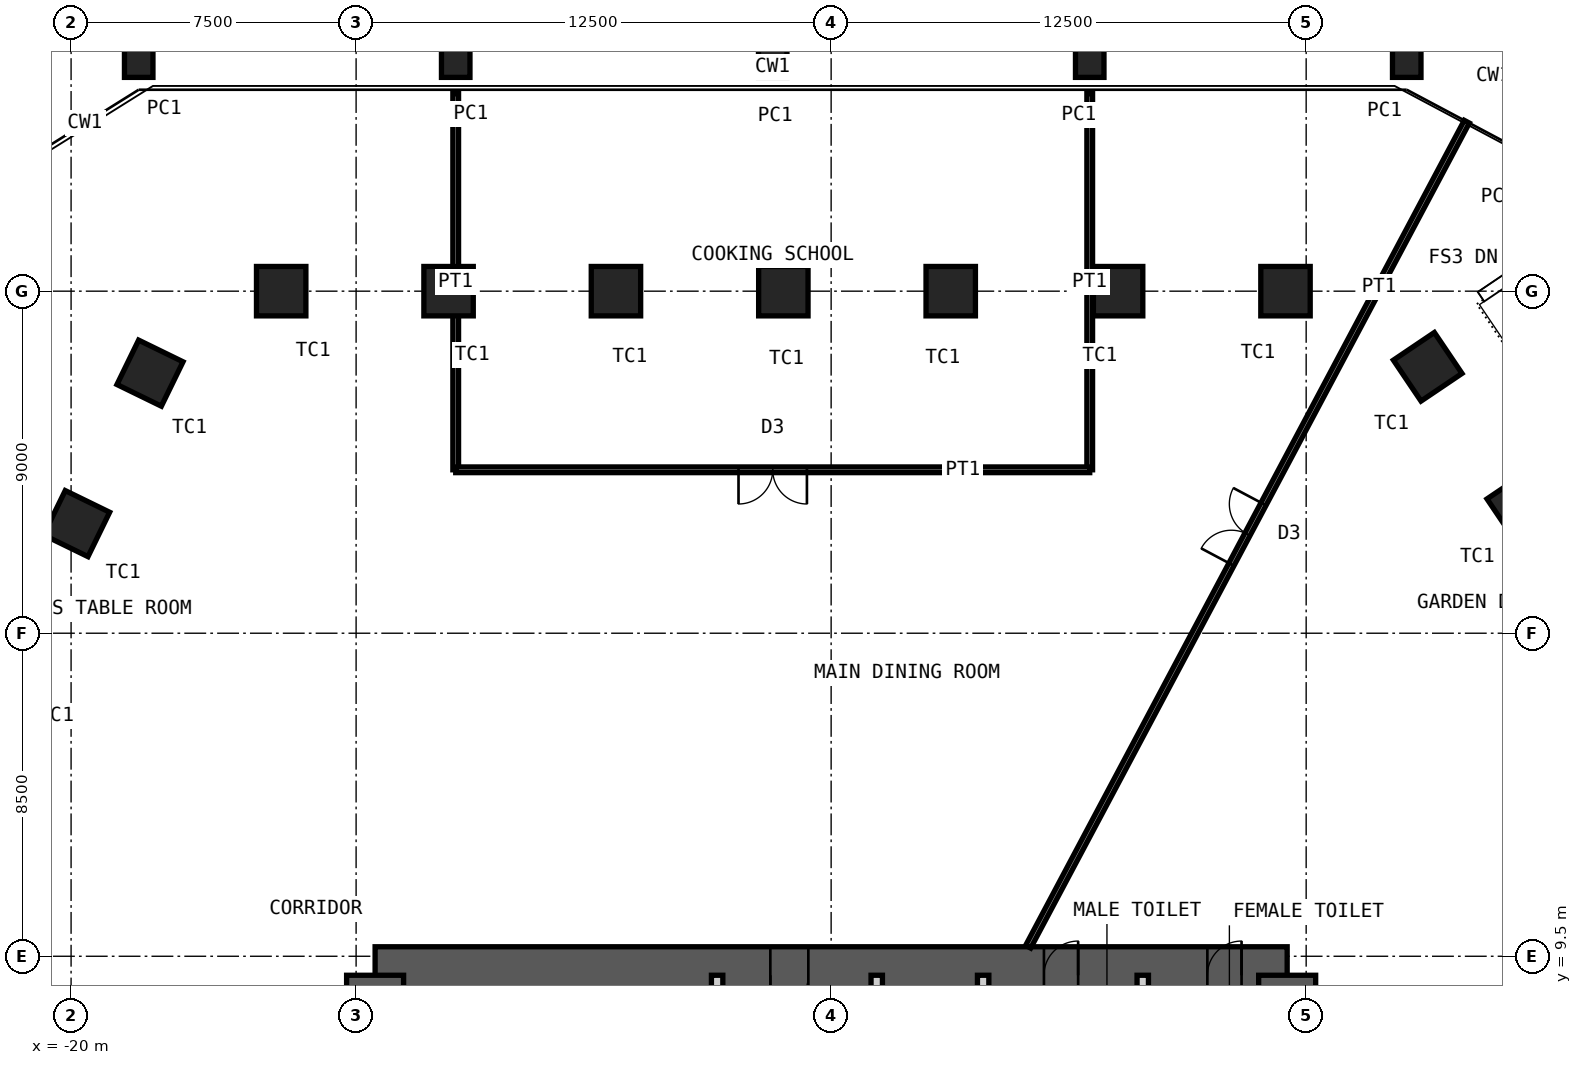
"""IFC4 building model, lengths in metres.
Left out: names, types, materials, properties, quantities, classifications, styles, units other than length and angle.
Written with IfcOpenShell. Run it as: python <this file> out.ifc"""

import sys

from ifc_helpers import new_model, si_unit, direction, frame, frame_2d, origin, origin_2d, place, context, subcontext, project, spatial, rectangle, hollow_rectangle, extrude, element, fill, save


model = new_model("IFC4")
c1 = context("Model", 3, precision=1e-05, world=origin(), true_north=direction((0.0, 1.0)))
c2 = subcontext(c1, "Body", "Model", "MODEL_VIEW")
j1 = project(units=[si_unit("LENGTHUNIT", "METRE"), si_unit("PLANEANGLEUNIT", "RADIAN")], contexts=[c1])
p1 = place(None, origin())
s1 = spatial("IfcSite", under=j1, at=p1, CompositionType="ELEMENT")
p2 = place(p1, origin())
s2 = spatial("IfcBuilding", under=s1, at=p2, CompositionType="ELEMENT")
p3 = place(p2, frame((0.0, 0.0, 12.0)))
s3 = spatial("IfcBuildingStorey", under=s2, at=p3, CompositionType="ELEMENT", Elevation=12.0)
for number, where, z_axis, x_axis in (
    (1, (-14.471, 27.0, 0.0), (0.0, 0.0, 1.0), (-1.0, 0.0, 0.0)),
    (2, (-10.067, 27.0, 0.0), (0.0, 0.0, 1.0), (-1.0, 0.0, 0.0)),
    (3, (-5.662, 27.0, 0.0), (0.0, 0.0, 1.0), (-1.0, 0.0, 0.0)),
    (4, (-1.258, 27.0, 0.0), (0.0, 0.0, 1.0), (-1.0, 0.0, 0.0)),
    (5, (3.147, 27.0, 0.0), (0.0, 0.0, 1.0), (-1.0, 0.0, 0.0)),
    (6, (7.552, 27.0, 0.0), (0.0, 0.0, 1.0), (-1.0, 0.0, 0.0)),
    (7, (11.956, 27.0, 0.0), (0.0, 0.0, 1.0), (-1.0, 0.0, 0.0)),
    (8, (15.698, 25.01, 0.0), (0.0, 0.0, 1.0), (-0.559, 0.829, 0.0)),
    (9, (18.161, 21.359, 0.0), (0.0, 0.0, 1.0), (-0.559, 0.829, 0.0)),
    (10, (-19.854, 20.884, 0.0), (0.0, 0.0, 1.0), (-0.438, -0.899, 0.0)),
    (11, (-17.924, 24.843, 0.0), (0.0, 0.0, 1.0), (-0.438, -0.899, 0.0)),
):
    element("IfcColumn", number, at=place(p3, frame(where, z_axis=z_axis, x_axis=x_axis)), inside=s3, PredefinedType="COLUMN", context=c2, shape_type="SweptSolid", body=[
        extrude(hollow_rectangle(XDim=1.3, YDim=1.3, WallThickness=0.1, at=origin_2d()), origin(), (0.0, 0.0, 1.0), 5.0),
    ])
for number, where, z_axis, x_axis in (
    (12, (-18.221, 33.0, 0.0), (0.0, 0.0, 1.0), (-1.0, 0.0, 0.0)),
    (13, (-9.879, 33.0, 0.0), (0.0, 0.0, 1.0), (-1.0, 0.0, 0.0)),
    (14, (-1.537, 33.0, 0.0), (0.0, 0.0, 1.0), (-1.0, 0.0, 0.0)),
    (15, (6.805, 33.0, 0.0), (0.0, 0.0, 1.0), (-1.0, 0.0, 0.0)),
    (16, (15.146, 33.0, 0.0), (0.0, 0.0, 1.0), (-1.0, 0.0, 0.0)),
):
    element("IfcColumn", number, at=place(p3, frame(where, z_axis=z_axis, x_axis=x_axis)), inside=s3, PredefinedType="COLUMN", context=c2, shape_type="SweptSolid", body=[
        extrude(hollow_rectangle(XDim=0.75, YDim=0.75, WallThickness=0.036, at=origin_2d()), origin(), (0.0, 0.0, 1.0), 5.0),
    ])
p4 = place(p3, frame((-12.0, 9.0, 0.0), z_axis=(0.0, 0.0, 1.0), x_axis=(1.0, 0.0, 0.0)))
e17 = element("IfcWall", 17, at=p4, inside=s3, PredefinedType="SHEAR", context=c2, shape_type="SweptSolid", body=[
    extrude(rectangle(XDim=24.0, YDim=1.5, at=frame_2d((12.0, 0.0))), origin(), (0.0, 0.0, 1.0), 5.0),
])
p5 = place(p4, frame((10.4, 0.0, 0.0)))
e18 = element("IfcOpeningElement", 18, at=p5, cuts=e17, PredefinedType="OPENING", context=c2, shape_type="SweptSolid", body=[
    extrude(rectangle(XDim=1.0, YDim=2.1, at=frame_2d((0.5, 1.05))), frame((0.0, 0.76, 0.0), z_axis=(0.0, -1.0, 0.0), x_axis=(1.0, 0.0, 0.0)), (0.0, 0.0, 1.0), 1.52),
])
p6 = place(p4, frame((17.6, 0.0, 0.0)))
e19 = element("IfcOpeningElement", 19, at=p6, cuts=e17, PredefinedType="OPENING", context=c2, shape_type="SweptSolid", body=[
    extrude(rectangle(XDim=0.9, YDim=2.1, at=frame_2d((0.45, 1.05))), frame((0.0, 0.76, 0.0), z_axis=(0.0, -1.0, 0.0), x_axis=(1.0, 0.0, 0.0)), (0.0, 0.0, 1.0), 1.52),
])
p7 = place(p4, frame((21.9, 0.0, 0.0)))
e20 = element("IfcOpeningElement", 20, at=p7, cuts=e17, PredefinedType="OPENING", context=c2, shape_type="SweptSolid", body=[
    extrude(rectangle(XDim=0.9, YDim=2.1, at=frame_2d((0.45, 1.05))), frame((0.0, 0.76, 0.0), z_axis=(0.0, -1.0, 0.0), x_axis=(1.0, 0.0, 0.0)), (0.0, 0.0, 1.0), 1.52),
])
p8 = place(p3, frame((12.0, -9.0, 0.0), z_axis=(0.0, 0.0, 1.0), x_axis=(0.0, 1.0, 0.0)))
e21 = element("IfcWall", 21, at=p8, inside=s3, PredefinedType="SHEAR", context=c2, shape_type="SweptSolid", body=[
    extrude(rectangle(XDim=18.0, YDim=1.5, at=frame_2d((9.0, 0.0))), origin(), (0.0, 0.0, 1.0), 5.0),
])
p9 = place(p8, frame((8.1, 0.0, 0.0)))
e22 = element("IfcOpeningElement", 22, at=p9, cuts=e21, PredefinedType="OPENING", context=c2, shape_type="SweptSolid", body=[
    extrude(rectangle(XDim=1.8, YDim=2.1, at=frame_2d((0.9, 1.05))), frame((0.0, 0.76, 0.0), z_axis=(0.0, -1.0, 0.0), x_axis=(1.0, 0.0, 0.0)), (0.0, 0.0, 1.0), 1.52),
])
p10 = place(p3, frame((-12.0, -9.0, 0.0), z_axis=(0.0, 0.0, 1.0), x_axis=(0.0, 1.0, 0.0)))
e23 = element("IfcWall", 23, at=p10, inside=s3, PredefinedType="SHEAR", context=c2, shape_type="SweptSolid", body=[
    extrude(rectangle(XDim=18.0, YDim=1.5, at=frame_2d((9.0, 0.0))), origin(), (0.0, 0.0, 1.0), 5.0),
])
p11 = place(p10, frame((8.1, 0.0, 0.0)))
e24 = element("IfcOpeningElement", 24, at=p11, cuts=e23, PredefinedType="OPENING", context=c2, shape_type="SweptSolid", body=[
    extrude(rectangle(XDim=1.8, YDim=2.1, at=frame_2d((0.9, 1.05))), frame((0.0, 0.76, 0.0), z_axis=(0.0, -1.0, 0.0), x_axis=(1.0, 0.0, 0.0)), (0.0, 0.0, 1.0), 1.52),
])
p12 = place(p3, frame((-3.0, 5.15, 0.0), z_axis=(0.0, 0.0, 1.0), x_axis=(0.0, 1.0, 0.0)))
e25 = element("IfcWall", 25, at=p12, inside=s3, PredefinedType="PARTITIONING", context=c2, shape_type="SweptSolid", body=[
    extrude(rectangle(XDim=3.85, YDim=0.3, at=frame_2d((1.925, 0.0))), origin(), (0.0, 0.0, 1.0), 4.78),
])
p13 = place(p12, frame((1.425, 0.0, 0.0)))
e26 = element("IfcOpeningElement", 26, at=p13, cuts=e25, PredefinedType="OPENING", context=c2, shape_type="SweptSolid", body=[
    extrude(rectangle(XDim=1.0, YDim=2.1, at=frame_2d((0.5, 1.05))), frame((0.0, 0.16, 0.0), z_axis=(0.0, -1.0, 0.0), x_axis=(1.0, 0.0, 0.0)), (0.0, 0.0, 1.0), 0.32),
])
p14 = place(p3, frame((1.2, 5.15, 0.0), z_axis=(0.0, 0.0, 1.0), x_axis=(0.0, 1.0, 0.0)))
e27 = element("IfcWall", 27, at=p14, inside=s3, PredefinedType="PARTITIONING", context=c2, shape_type="SweptSolid", body=[
    extrude(rectangle(XDim=3.85, YDim=0.3, at=frame_2d((1.925, 0.0))), origin(), (0.0, 0.0, 1.0), 4.78),
])
p15 = place(p14, frame((1.375, 0.0, 0.0)))
e28 = element("IfcOpeningElement", 28, at=p15, cuts=e27, PredefinedType="OPENING", context=c2, shape_type="SweptSolid", body=[
    extrude(rectangle(XDim=1.1, YDim=2.4, at=frame_2d((0.55, 1.2))), frame((0.0, 0.16, 0.0), z_axis=(0.0, -1.0, 0.0), x_axis=(1.0, 0.0, 0.0)), (0.0, 0.0, 1.0), 0.32),
])
for number, where, z_axis, x_axis in (
    (29, (4.0, 5.15, 0.0), (0.0, 0.0, 1.0), (0.0, 1.0, 0.0)),
    (30, (8.2, 5.15, 0.0), (0.0, 0.0, 1.0), (0.0, 1.0, 0.0)),
):
    element("IfcWall", number, at=place(p3, frame(where, z_axis=z_axis, x_axis=x_axis)), inside=s3, PredefinedType="PARTITIONING", context=c2, shape_type="SweptSolid", body=[
        extrude(rectangle(XDim=3.85, YDim=0.3, at=frame_2d((1.925, 0.0))), origin(), (0.0, 0.0, 1.0), 4.78),
    ])
p16 = place(p3, frame((-9.879, 32.2, 0.0), z_axis=(0.0, 0.0, 1.0), x_axis=(0.0, -1.0, 0.0)))
e31 = element("IfcWall", 31, at=p16, inside=s3, PredefinedType="PARTITIONING", context=c2, shape_type="SweptSolid", body=[
    extrude(rectangle(XDim=9.9, YDim=0.15, at=frame_2d((4.95, 0.0))), origin(), (0.0, 0.0, 1.0), 4.7),
])
p17 = place(p3, frame((6.805, 32.2, 0.0), z_axis=(0.0, 0.0, 1.0), x_axis=(0.0, -1.0, 0.0)))
e32 = element("IfcWall", 32, at=p17, inside=s3, PredefinedType="PARTITIONING", context=c2, shape_type="SweptSolid", body=[
    extrude(rectangle(XDim=9.9, YDim=0.15, at=frame_2d((4.95, 0.0))), origin(), (0.0, 0.0, 1.0), 3.6),
])
p18 = place(p3, frame((-9.879, 22.3, 0.0), z_axis=(0.0, 0.0, 1.0), x_axis=(1.0, 0.0, 0.0)))
e33 = element("IfcWall", 33, at=p18, inside=s3, PredefinedType="PARTITIONING", context=c2, shape_type="SweptSolid", body=[
    extrude(rectangle(XDim=16.684, YDim=0.15, at=frame_2d((8.342, 0.0))), origin(), (0.0, 0.0, 1.0), 4.7),
])
p19 = place(p18, frame((7.442, 0.0, 0.0)))
e34 = element("IfcOpeningElement", 34, at=p19, cuts=e33, PredefinedType="OPENING", context=c2, shape_type="SweptSolid", body=[
    extrude(rectangle(XDim=1.8, YDim=2.4, at=frame_2d((0.9, 1.2))), frame((0.0, 0.085, 0.0), z_axis=(0.0, -1.0, 0.0), x_axis=(1.0, 0.0, 0.0)), (0.0, 0.0, 1.0), 0.17),
])
p20 = place(p3, frame((5.184, 9.75, 0.0), z_axis=(0.0, 0.0, 1.0), x_axis=(0.469474147629, 0.882946218469, 0.0)))
e35 = element("IfcWall", 35, at=p20, inside=s3, PredefinedType="PARTITIONING", context=c2, shape_type="SweptSolid", body=[
    extrude(rectangle(XDim=24.588, YDim=0.15, at=frame_2d((12.294, 0.0))), origin(), (0.0, 0.0, 1.0), 4.7),
])
p21 = place(p20, frame((11.394, 0.0, 0.0)))
e36 = element("IfcOpeningElement", 36, at=p21, cuts=e35, PredefinedType="OPENING", context=c2, shape_type="SweptSolid", body=[
    extrude(rectangle(XDim=1.8, YDim=2.4, at=frame_2d((0.9, 1.2))), frame((0.0, 0.085, 0.0), z_axis=(0.0, -1.0, 0.0), x_axis=(1.0, 0.0, 0.0)), (0.0, 0.0, 1.0), 0.17),
])
p22 = place(p5, origin())
e37 = element("IfcDoor", 37, at=p22, inside=s3, OperationType="SINGLE_SWING_LEFT", PredefinedType="DOOR", context=c2, shape_type="SweptSolid", body=[
    extrude(rectangle(XDim=1.0, YDim=2.1, at=frame_2d((0.5, 1.05))), frame((0.0, 0.025, 0.0), z_axis=(0.0, -1.0, 0.0), x_axis=(1.0, 0.0, 0.0)), (0.0, 0.0, 1.0), 0.05),
])
fill(e18, e37)
p23 = place(p6, origin())
e38 = element("IfcDoor", 38, at=p23, inside=s3, OperationType="SINGLE_SWING_LEFT", PredefinedType="DOOR", context=c2, shape_type="SweptSolid", body=[
    extrude(rectangle(XDim=0.9, YDim=2.1, at=frame_2d((0.45, 1.05))), frame((0.0, 0.025, 0.0), z_axis=(0.0, -1.0, 0.0), x_axis=(1.0, 0.0, 0.0)), (0.0, 0.0, 1.0), 0.05),
])
fill(e19, e38)
p24 = place(p7, origin())
e39 = element("IfcDoor", 39, at=p24, inside=s3, OperationType="SINGLE_SWING_LEFT", PredefinedType="DOOR", context=c2, shape_type="SweptSolid", body=[
    extrude(rectangle(XDim=0.9, YDim=2.1, at=frame_2d((0.45, 1.05))), frame((0.0, 0.025, 0.0), z_axis=(0.0, -1.0, 0.0), x_axis=(1.0, 0.0, 0.0)), (0.0, 0.0, 1.0), 0.05),
])
fill(e20, e39)
p25 = place(p19, origin())
e40 = element("IfcDoor", 40, at=p25, inside=s3, OperationType="DOUBLE_DOOR_DOUBLE_SWING", PredefinedType="DOOR", context=c2, shape_type="SweptSolid", body=[
    extrude(rectangle(XDim=1.8, YDim=2.4, at=frame_2d((0.9, 1.2))), frame((0.0, 0.025, 0.0), z_axis=(0.0, -1.0, 0.0), x_axis=(1.0, 0.0, 0.0)), (0.0, 0.0, 1.0), 0.05),
])
fill(e34, e40)
p26 = place(p21, origin())
e41 = element("IfcDoor", 41, at=p26, inside=s3, OperationType="DOUBLE_DOOR_DOUBLE_SWING", PredefinedType="DOOR", context=c2, shape_type="SweptSolid", body=[
    extrude(rectangle(XDim=1.8, YDim=2.4, at=frame_2d((0.9, 1.2))), frame((0.0, 0.025, 0.0), z_axis=(0.0, -1.0, 0.0), x_axis=(1.0, 0.0, 0.0)), (0.0, 0.0, 1.0), 0.05),
])
fill(e36, e41)
save(model, sys.argv[1])
